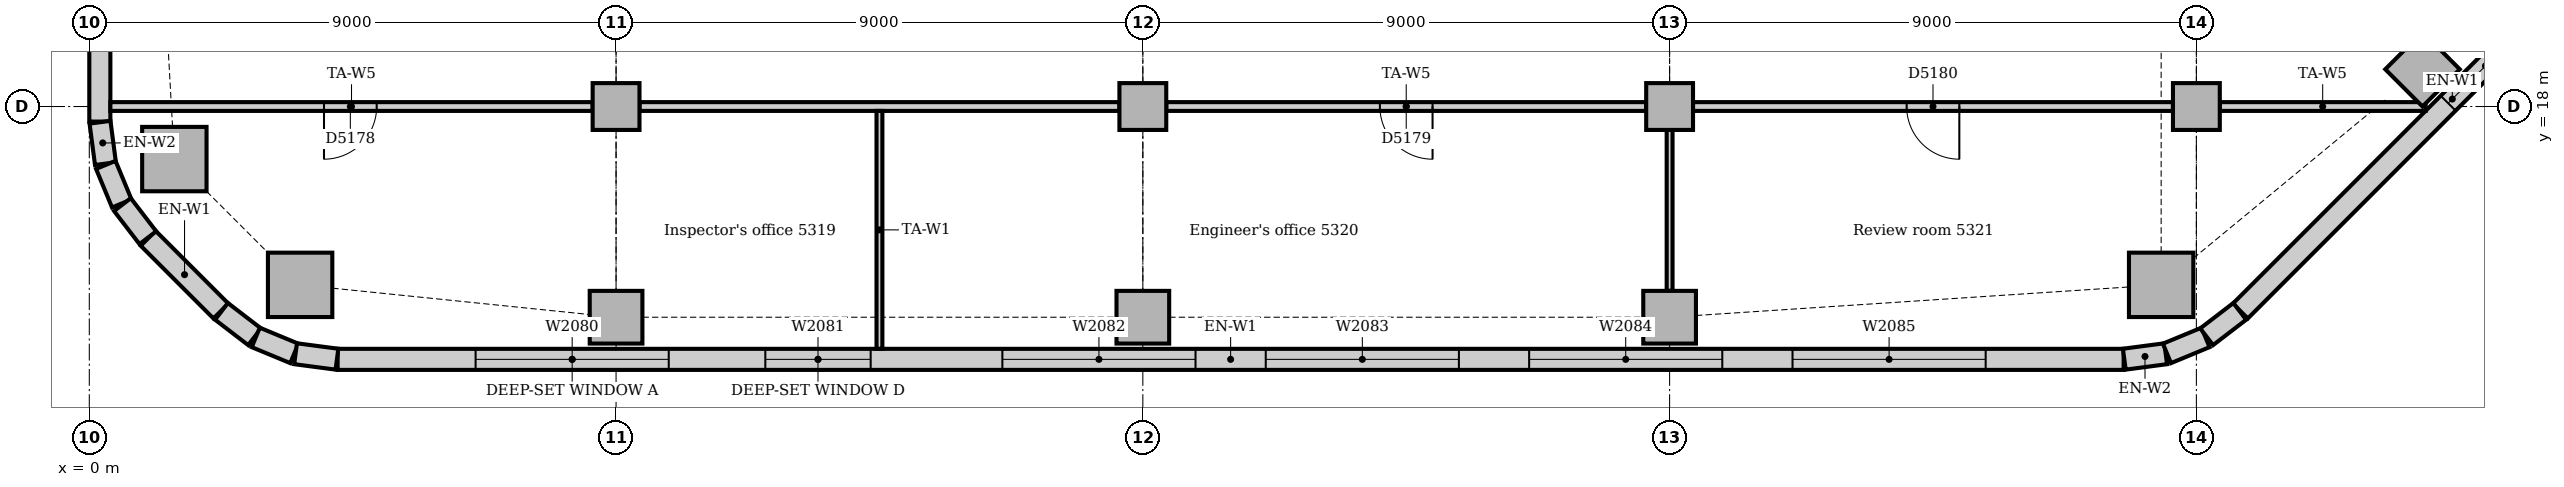
"""IFC4 building model, lengths in metres.
Left out: names, types, materials, properties, quantities, classifications, styles, units other than length and angle.
Written with IfcOpenShell. Run it as: python <this file> out.ifc"""

import sys

from ifc_helpers import new_model, si_unit, direction, frame, frame_2d, origin, origin_2d, place, context, subcontext, project, spatial, rectangle, extrude, element, fill, save


model = new_model("IFC4")
c1 = context("Model", 3, precision=1e-05, world=origin(), true_north=direction((0.0, 1.0)))
c2 = subcontext(c1, "Body", "Model", "MODEL_VIEW")
j1 = project(units=[si_unit("LENGTHUNIT", "METRE"), si_unit("PLANEANGLEUNIT", "RADIAN")], contexts=[c1])
p1 = place(None, origin())
s1 = spatial("IfcSite", under=j1, at=p1, CompositionType="ELEMENT")
p2 = place(p1, origin())
s2 = spatial("IfcBuilding", under=s1, at=p2, CompositionType="ELEMENT")
p3 = place(p2, frame((0.0, 0.0, 222.0)))
s3 = spatial("IfcBuildingStorey", under=s2, at=p3, CompositionType="ELEMENT", Elevation=222.0)
for number, where, z_axis, x_axis in (
    (1, (3.602, 14.953, 0.0), (0.0, 0.0, 1.0), (1.0, 0.0, 0.0)),
    (2, (35.398, 14.953, 0.0), (0.0, 0.0, 1.0), (1.0, 0.0, 0.0)),
    (3, (1.453, 17.102, 0.0), (0.0, 0.0, 1.0), (1.0, 0.0, 0.0)),
):
    element("IfcColumn", number, at=place(p3, frame(where, z_axis=z_axis, x_axis=x_axis)), inside=s3, PredefinedType="COLUMN", context=c2, shape_type="SweptSolid", body=[
        extrude(rectangle(XDim=1.1, YDim=1.1, at=origin_2d()), origin(), (0.0, 0.0, 1.0), 3.85),
    ])
for number, where, z_axis, x_axis in (
    (4, (9.0, 14.4, 0.0), (0.0, 0.0, 1.0), (1.0, 0.0, 0.0)),
    (5, (18.0, 14.4, 0.0), (0.0, 0.0, 1.0), (1.0, 0.0, 0.0)),
    (6, (27.0, 14.4, 0.0), (0.0, 0.0, 1.0), (1.0, 0.0, 0.0)),
    (7, (39.864, 18.636, 0.0), (0.0, 0.0, 1.0), (0.707, 0.707, 0.0)),
):
    element("IfcColumn", number, at=place(p3, frame(where, z_axis=z_axis, x_axis=x_axis)), inside=s3, PredefinedType="COLUMN", context=c2, shape_type="SweptSolid", body=[
        extrude(rectangle(XDim=0.9, YDim=0.9, at=origin_2d()), origin(), (0.0, 0.0, 1.0), 3.85),
    ])
for number, where, z_axis, x_axis in (
    (8, (9.0, 18.0, 0.0), (0.0, 0.0, 1.0), (1.0, 0.0, 0.0)),
    (9, (18.0, 18.0, 0.0), (0.0, 0.0, 1.0), (1.0, 0.0, 0.0)),
    (10, (27.0, 18.0, 0.0), (0.0, 0.0, 1.0), (1.0, 0.0, 0.0)),
    (11, (36.0, 18.0, 0.0), (0.0, 0.0, 1.0), (1.0, 0.0, 0.0)),
):
    element("IfcColumn", number, at=place(p3, frame(where, z_axis=z_axis, x_axis=x_axis)), inside=s3, PredefinedType="COLUMN", context=c2, shape_type="SweptSolid", body=[
        extrude(rectangle(XDim=0.8, YDim=0.8, at=origin_2d()), origin(), (0.0, 0.0, 1.0), 3.85),
    ])
p4 = place(p3, frame((4.243, 13.68, 0.0), z_axis=(0.0, 0.0, 1.0), x_axis=(1.0, 0.0, 0.0)))
e12 = element("IfcWall", 12, at=p4, inside=s3, PredefinedType="STANDARD", context=c2, shape_type="SweptSolid", body=[
    extrude(rectangle(XDim=30.515, YDim=0.36, at=frame_2d((15.257, 0.0))), origin(), (0.0, 0.0, 1.0), 3.85),
])
p5 = place(p4, frame((2.357, 0.0, 0.9)))
e13 = element("IfcOpeningElement", 13, at=p5, cuts=e12, PredefinedType="OPENING", context=c2, shape_type="SweptSolid", body=[
    extrude(rectangle(XDim=3.3, YDim=1.6, at=frame_2d((1.65, 0.8))), frame((0.0, 0.19, 0.0), z_axis=(0.0, -1.0, 0.0), x_axis=(1.0, 0.0, 0.0)), (0.0, 0.0, 1.0), 0.38),
])
p6 = place(p4, frame((7.307, 0.0, 0.9)))
e14 = element("IfcOpeningElement", 14, at=p6, cuts=e12, PredefinedType="OPENING", context=c2, shape_type="SweptSolid", body=[
    extrude(rectangle(XDim=1.8, YDim=1.6, at=frame_2d((0.9, 0.8))), frame((0.0, 0.19, 0.0), z_axis=(0.0, -1.0, 0.0), x_axis=(1.0, 0.0, 0.0)), (0.0, 0.0, 1.0), 0.38),
])
p7 = place(p4, frame((11.357, 0.0, 0.9)))
e15 = element("IfcOpeningElement", 15, at=p7, cuts=e12, PredefinedType="OPENING", context=c2, shape_type="SweptSolid", body=[
    extrude(rectangle(XDim=3.3, YDim=1.6, at=frame_2d((1.65, 0.8))), frame((0.0, 0.19, 0.0), z_axis=(0.0, -1.0, 0.0), x_axis=(1.0, 0.0, 0.0)), (0.0, 0.0, 1.0), 0.38),
])
p8 = place(p4, frame((15.857, 0.0, 0.9)))
e16 = element("IfcOpeningElement", 16, at=p8, cuts=e12, PredefinedType="OPENING", context=c2, shape_type="SweptSolid", body=[
    extrude(rectangle(XDim=3.3, YDim=1.6, at=frame_2d((1.65, 0.8))), frame((0.0, 0.19, 0.0), z_axis=(0.0, -1.0, 0.0), x_axis=(1.0, 0.0, 0.0)), (0.0, 0.0, 1.0), 0.38),
])
p9 = place(p4, frame((20.357, 0.0, 0.9)))
e17 = element("IfcOpeningElement", 17, at=p9, cuts=e12, PredefinedType="OPENING", context=c2, shape_type="SweptSolid", body=[
    extrude(rectangle(XDim=3.3, YDim=1.6, at=frame_2d((1.65, 0.8))), frame((0.0, 0.19, 0.0), z_axis=(0.0, -1.0, 0.0), x_axis=(1.0, 0.0, 0.0)), (0.0, 0.0, 1.0), 0.38),
])
p10 = place(p4, frame((24.857, 0.0, 0.9)))
e18 = element("IfcOpeningElement", 18, at=p10, cuts=e12, PredefinedType="OPENING", context=c2, shape_type="SweptSolid", body=[
    extrude(rectangle(XDim=3.3, YDim=1.6, at=frame_2d((1.65, 0.8))), frame((0.0, 0.19, 0.0), z_axis=(0.0, -1.0, 0.0), x_axis=(1.0, 0.0, 0.0)), (0.0, 0.0, 1.0), 0.38),
])
p11 = place(p3, frame((36.751, 14.506, 0.0), z_axis=(0.0, 0.0, 1.0), x_axis=(0.707106781187, 0.707106781187, 0.0)))
e19 = element("IfcWall", 19, at=p11, inside=s3, PredefinedType="STANDARD", context=c2, shape_type="SweptSolid", body=[
    extrude(rectangle(XDim=10.243, YDim=0.36, at=frame_2d((5.121, 0.0))), origin(), (0.0, 0.0, 1.0), 3.85),
])
p12 = place(p11, frame((5.021, 0.0, 0.9)))
e20 = element("IfcOpeningElement", 20, at=p12, cuts=e19, PredefinedType="OPENING", context=c2, shape_type="SweptSolid", body=[
    extrude(rectangle(XDim=1.8, YDim=1.6, at=frame_2d((0.9, 0.8))), frame((0.0, 0.19, 0.0), z_axis=(0.0, -1.0, 0.0), x_axis=(1.0, 0.0, 0.0)), (0.0, 0.0, 1.0), 0.38),
])
p13 = place(p3, frame((0.18, 21.0, 0.0), z_axis=(0.0, 0.0, 1.0), x_axis=(0.0, -1.0, 0.0)))
e21 = element("IfcWall", 21, at=p13, inside=s3, PredefinedType="STANDARD", context=c2, shape_type="SweptSolid", body=[
    extrude(rectangle(XDim=3.257, YDim=0.36, at=frame_2d((1.629, 0.0))), origin(), (0.0, 0.0, 1.0), 3.85),
])
p14 = place(p3, frame((1.006, 15.749, 0.0), z_axis=(0.0, 0.0, 1.0), x_axis=(0.707106781187, -0.707106781187, 0.0)))
e22 = element("IfcWall", 22, at=p14, inside=s3, PredefinedType="STANDARD", context=c2, shape_type="SweptSolid", body=[
    extrude(rectangle(XDim=1.757, YDim=0.36, at=frame_2d((0.879, 0.0))), origin(), (0.0, 0.0, 1.0), 3.85),
])
for number, where, z_axis, x_axis in (
    (23, (34.769, 13.683, 0.0), (0.0, 0.0, 1.0), (0.991, 0.131, 0.0)),
    (24, (35.497, 13.782, 0.0), (0.0, 0.0, 1.0), (0.924, 0.383, 0.0)),
):
    element("IfcWall", number, at=place(p3, frame(where, z_axis=z_axis, x_axis=x_axis)), inside=s3, PredefinedType="STANDARD", context=c2, shape_type="SweptSolid", body=[
        extrude(rectangle(XDim=0.713, YDim=0.36, at=frame_2d((0.356, 0.0))), origin(), (0.0, 0.0, 1.0), 3.85),
    ])
p15 = place(p3, frame((36.175, 14.066, 0.0), z_axis=(0.0, 0.0, 1.0), x_axis=(0.793321924995, 0.608802368033, 0.0)))
e25 = element("IfcWall", 25, at=p15, inside=s3, PredefinedType="STANDARD", context=c2, shape_type="SweptSolid", body=[
    extrude(rectangle(XDim=0.713, YDim=0.36, at=frame_2d((0.357, 0.0))), origin(), (0.0, 0.0, 1.0), 3.85),
])
for number, where, z_axis, x_axis in (
    (26, (0.183, 17.731, 0.0), (0.0, 0.0, 1.0), (0.131, -0.991, 0.0)),
    (27, (0.282, 17.003, 0.0), (0.0, 0.0, 1.0), (0.383, -0.924, 0.0)),
):
    element("IfcWall", number, at=place(p3, frame(where, z_axis=z_axis, x_axis=x_axis)), inside=s3, PredefinedType="STANDARD", context=c2, shape_type="SweptSolid", body=[
        extrude(rectangle(XDim=0.713, YDim=0.36, at=frame_2d((0.356, 0.0))), origin(), (0.0, 0.0, 1.0), 3.85),
    ])
for number, where, z_axis, x_axis in (
    (28, (0.566, 16.325, 0.0), (0.0, 0.0, 1.0), (0.609, -0.793, 0.0)),
    (29, (2.259, 14.5, 0.0), (0.0, 0.0, 1.0), (0.793, -0.609, 0.0)),
):
    element("IfcWall", number, at=place(p3, frame(where, z_axis=z_axis, x_axis=x_axis)), inside=s3, PredefinedType="STANDARD", context=c2, shape_type="SweptSolid", body=[
        extrude(rectangle(XDim=0.713, YDim=0.36, at=frame_2d((0.357, 0.0))), origin(), (0.0, 0.0, 1.0), 3.85),
    ])
for number, where, z_axis, x_axis in (
    (30, (2.844, 14.055, 0.0), (0.0, 0.0, 1.0), (0.924, -0.383, 0.0)),
    (31, (3.524, 13.776, 0.0), (0.0, 0.0, 1.0), (0.991, -0.131, 0.0)),
):
    element("IfcWall", number, at=place(p3, frame(where, z_axis=z_axis, x_axis=x_axis)), inside=s3, PredefinedType="STANDARD", context=c2, shape_type="SweptSolid", body=[
        extrude(rectangle(XDim=0.713, YDim=0.36, at=frame_2d((0.356, 0.0))), origin(), (0.0, 0.0, 1.0), 3.85),
    ])
p16 = place(p3, frame((36.4, 18.0, 0.0), z_axis=(0.0, 0.0, 1.0), x_axis=(1.0, 0.0, 0.0)))
e32 = element("IfcWall", 32, at=p16, inside=s3, PredefinedType="PARTITIONING", context=c2, shape_type="SweptSolid", body=[
    extrude(rectangle(XDim=3.516, YDim=0.15, at=frame_2d((1.758, 0.0))), origin(), (0.0, 0.0, 1.0), 3.602),
])
p17 = place(p3, frame((27.4, 18.0, 0.0), z_axis=(0.0, 0.0, 1.0), x_axis=(1.0, 0.0, 0.0)))
e33 = element("IfcWall", 33, at=p17, inside=s3, PredefinedType="PARTITIONING", context=c2, shape_type="SweptSolid", body=[
    extrude(rectangle(XDim=8.2, YDim=0.15, at=frame_2d((4.1, 0.0))), origin(), (0.0, 0.0, 1.0), 3.254),
])
p18 = place(p17, frame((3.65, 0.0, 0.0)))
e34 = element("IfcOpeningElement", 34, at=p18, cuts=e33, PredefinedType="OPENING", context=c2, shape_type="SweptSolid", body=[
    extrude(rectangle(XDim=0.9, YDim=2.1, at=frame_2d((0.45, 1.05))), frame((0.0, 0.085, 0.0), z_axis=(0.0, -1.0, 0.0), x_axis=(1.0, 0.0, 0.0)), (0.0, 0.0, 1.0), 0.17),
])
p19 = place(p3, frame((18.4, 18.0, 0.0), z_axis=(0.0, 0.0, 1.0), x_axis=(1.0, 0.0, 0.0)))
e35 = element("IfcWall", 35, at=p19, inside=s3, PredefinedType="PARTITIONING", context=c2, shape_type="SweptSolid", body=[
    extrude(rectangle(XDim=8.2, YDim=0.15, at=frame_2d((4.1, 0.0))), origin(), (0.0, 0.0, 1.0), 3.254),
])
p20 = place(p19, frame((3.65, 0.0, 0.0)))
e36 = element("IfcOpeningElement", 36, at=p20, cuts=e35, PredefinedType="OPENING", context=c2, shape_type="SweptSolid", body=[
    extrude(rectangle(XDim=0.9, YDim=2.1, at=frame_2d((0.45, 1.05))), frame((0.0, 0.085, 0.0), z_axis=(0.0, -1.0, 0.0), x_axis=(1.0, 0.0, 0.0)), (0.0, 0.0, 1.0), 0.17),
])
p21 = place(p3, frame((9.4, 18.0, 0.0), z_axis=(0.0, 0.0, 1.0), x_axis=(1.0, 0.0, 0.0)))
e37 = element("IfcWall", 37, at=p21, inside=s3, PredefinedType="PARTITIONING", context=c2, shape_type="SweptSolid", body=[
    extrude(rectangle(XDim=8.2, YDim=0.15, at=frame_2d((4.1, 0.0))), origin(), (0.0, 0.0, 1.0), 3.254),
])
p22 = place(p3, frame((0.36, 18.0, 0.0), z_axis=(0.0, 0.0, 1.0), x_axis=(1.0, 0.0, 0.0)))
e38 = element("IfcWall", 38, at=p22, inside=s3, PredefinedType="PARTITIONING", context=c2, shape_type="SweptSolid", body=[
    extrude(rectangle(XDim=8.24, YDim=0.15, at=frame_2d((4.12, 0.0))), origin(), (0.0, 0.0, 1.0), 3.254),
])
p23 = place(p22, frame((3.65, 0.0, 0.0)))
e39 = element("IfcOpeningElement", 39, at=p23, cuts=e38, PredefinedType="OPENING", context=c2, shape_type="SweptSolid", body=[
    extrude(rectangle(XDim=0.9, YDim=2.1, at=frame_2d((0.45, 1.05))), frame((0.0, 0.085, 0.0), z_axis=(0.0, -1.0, 0.0), x_axis=(1.0, 0.0, 0.0)), (0.0, 0.0, 1.0), 0.17),
])
p24 = place(p3, frame((13.5, 13.86, 0.0), z_axis=(0.0, 0.0, 1.0), x_axis=(0.0, 1.0, 0.0)))
e40 = element("IfcWall", 40, at=p24, inside=s3, PredefinedType="PARTITIONING", context=c2, shape_type="SweptSolid", body=[
    extrude(rectangle(XDim=4.065, YDim=0.1, at=frame_2d((2.033, 0.0))), origin(), (0.0, 0.0, 1.0), 3.85),
])
p25 = place(p3, frame((27.0, 14.85, 0.0), z_axis=(0.0, 0.0, 1.0), x_axis=(0.0, 1.0, 0.0)))
e41 = element("IfcWall", 41, at=p25, inside=s3, PredefinedType="PARTITIONING", context=c2, shape_type="SweptSolid", body=[
    extrude(rectangle(XDim=2.75, YDim=0.1, at=frame_2d((1.375, 0.0))), origin(), (0.0, 0.0, 1.0), 3.652),
])
p26 = place(p5, origin())
e42 = element("IfcWindow", 42, at=p26, inside=s3, PartitioningType="SINGLE_PANEL", PredefinedType="WINDOW", context=c2, shape_type="SweptSolid", body=[
    extrude(rectangle(XDim=3.3, YDim=1.6, at=frame_2d((1.65, 0.8))), frame((0.0, 0.13, 0.0), z_axis=(0.0, -1.0, 0.0), x_axis=(1.0, 0.0, 0.0)), (0.0, 0.0, 1.0), 0.06),
])
fill(e13, e42)
p27 = place(p6, origin())
e43 = element("IfcWindow", 43, at=p27, inside=s3, PartitioningType="SINGLE_PANEL", PredefinedType="WINDOW", context=c2, shape_type="SweptSolid", body=[
    extrude(rectangle(XDim=1.8, YDim=1.6, at=frame_2d((0.9, 0.8))), frame((0.0, 0.13, 0.0), z_axis=(0.0, -1.0, 0.0), x_axis=(1.0, 0.0, 0.0)), (0.0, 0.0, 1.0), 0.06),
])
fill(e14, e43)
p28 = place(p7, origin())
e44 = element("IfcWindow", 44, at=p28, inside=s3, PartitioningType="SINGLE_PANEL", PredefinedType="WINDOW", context=c2, shape_type="SweptSolid", body=[
    extrude(rectangle(XDim=3.3, YDim=1.6, at=frame_2d((1.65, 0.8))), frame((0.0, 0.13, 0.0), z_axis=(0.0, -1.0, 0.0), x_axis=(1.0, 0.0, 0.0)), (0.0, 0.0, 1.0), 0.06),
])
fill(e15, e44)
p29 = place(p8, origin())
e45 = element("IfcWindow", 45, at=p29, inside=s3, PartitioningType="SINGLE_PANEL", PredefinedType="WINDOW", context=c2, shape_type="SweptSolid", body=[
    extrude(rectangle(XDim=3.3, YDim=1.6, at=frame_2d((1.65, 0.8))), frame((0.0, 0.13, 0.0), z_axis=(0.0, -1.0, 0.0), x_axis=(1.0, 0.0, 0.0)), (0.0, 0.0, 1.0), 0.06),
])
fill(e16, e45)
p30 = place(p9, origin())
e46 = element("IfcWindow", 46, at=p30, inside=s3, PartitioningType="SINGLE_PANEL", PredefinedType="WINDOW", context=c2, shape_type="SweptSolid", body=[
    extrude(rectangle(XDim=3.3, YDim=1.6, at=frame_2d((1.65, 0.8))), frame((0.0, 0.13, 0.0), z_axis=(0.0, -1.0, 0.0), x_axis=(1.0, 0.0, 0.0)), (0.0, 0.0, 1.0), 0.06),
])
fill(e17, e46)
p31 = place(p10, origin())
e47 = element("IfcWindow", 47, at=p31, inside=s3, PartitioningType="SINGLE_PANEL", PredefinedType="WINDOW", context=c2, shape_type="SweptSolid", body=[
    extrude(rectangle(XDim=3.3, YDim=1.6, at=frame_2d((1.65, 0.8))), frame((0.0, 0.13, 0.0), z_axis=(0.0, -1.0, 0.0), x_axis=(1.0, 0.0, 0.0)), (0.0, 0.0, 1.0), 0.06),
])
fill(e18, e47)
p32 = place(p12, origin())
e48 = element("IfcWindow", 48, at=p32, inside=s3, PartitioningType="SINGLE_PANEL", PredefinedType="WINDOW", context=c2, shape_type="SweptSolid", body=[
    extrude(rectangle(XDim=1.8, YDim=1.6, at=frame_2d((0.9, 0.8))), frame((0.0, 0.13, 0.0), z_axis=(0.0, -1.0, 0.0), x_axis=(1.0, 0.0, 0.0)), (0.0, 0.0, 1.0), 0.06),
])
fill(e20, e48)
p33 = place(p23, frame((0.9, 0.0, 0.0), z_axis=(0.0, 0.0, 1.0), x_axis=(-1.0, 0.0, 0.0)))
e49 = element("IfcDoor", 49, at=p33, inside=s3, OperationType="SINGLE_SWING_RIGHT", PredefinedType="DOOR", context=c2, shape_type="SweptSolid", body=[
    extrude(rectangle(XDim=0.9, YDim=2.1, at=frame_2d((0.45, 1.05))), frame((0.0, 0.025, 0.0), z_axis=(0.0, -1.0, 0.0), x_axis=(1.0, 0.0, 0.0)), (0.0, 0.0, 1.0), 0.05),
])
fill(e39, e49)
p34 = place(p20, frame((0.9, 0.0, 0.0), z_axis=(0.0, 0.0, 1.0), x_axis=(-1.0, 0.0, 0.0)))
e50 = element("IfcDoor", 50, at=p34, inside=s3, OperationType="SINGLE_SWING_LEFT", PredefinedType="DOOR", context=c2, shape_type="SweptSolid", body=[
    extrude(rectangle(XDim=0.9, YDim=2.1, at=frame_2d((0.45, 1.05))), frame((0.0, 0.025, 0.0), z_axis=(0.0, -1.0, 0.0), x_axis=(1.0, 0.0, 0.0)), (0.0, 0.0, 1.0), 0.05),
])
fill(e36, e50)
p35 = place(p18, frame((0.9, 0.0, 0.0), z_axis=(0.0, 0.0, 1.0), x_axis=(-1.0, 0.0, 0.0)))
e51 = element("IfcDoor", 51, at=p35, inside=s3, OperationType="SINGLE_SWING_LEFT", PredefinedType="DOOR", context=c2, shape_type="SweptSolid", body=[
    extrude(rectangle(XDim=0.9, YDim=2.1, at=frame_2d((0.45, 1.05))), frame((0.0, 0.025, 0.0), z_axis=(0.0, -1.0, 0.0), x_axis=(1.0, 0.0, 0.0)), (0.0, 0.0, 1.0), 0.05),
])
fill(e34, e51)
save(model, sys.argv[1])
